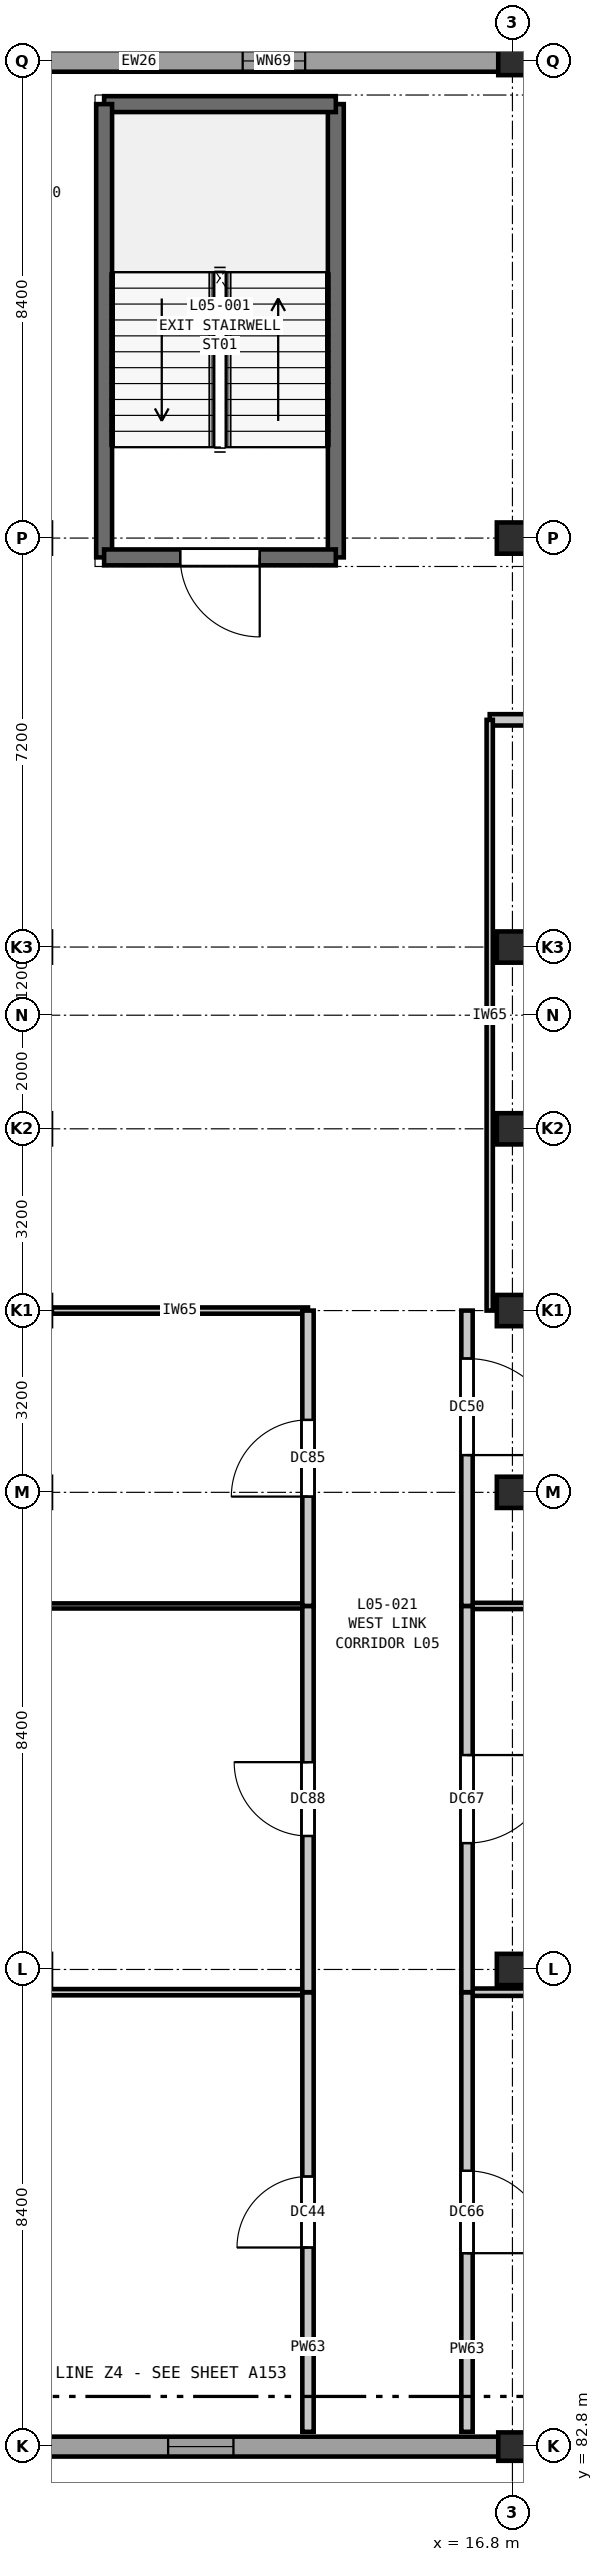
"""IFC4 building model, lengths in metres.
Left out: names, types, materials, properties, quantities, classifications, styles, units other than length and angle.
Written with IfcOpenShell. Run it as: python <this file> out.ifc"""

import sys

from ifc_helpers import new_model, si_unit, direction, frame, frame_2d, origin, origin_2d, place, context, subcontext, project, spatial, rectangle, extrude, element, fill, save


model = new_model("IFC4")
c1 = context("Model", 3, precision=1e-05, world=origin(), true_north=direction((0.0, 1.0)))
c2 = subcontext(c1, "Body", "Model", "MODEL_VIEW")
j1 = project(units=[si_unit("LENGTHUNIT", "METRE"), si_unit("PLANEANGLEUNIT", "RADIAN")], contexts=[c1])
p1 = place(None, origin())
s1 = spatial("IfcSite", under=j1, at=p1, CompositionType="ELEMENT")
p2 = place(p1, origin())
s2 = spatial("IfcBuilding", under=s1, at=p2, CompositionType="ELEMENT")
p3 = place(p2, frame((0.0, 0.0, 24.6)))
s3 = spatial("IfcBuildingStorey", under=s2, at=p3, CompositionType="ELEMENT", Elevation=24.6)
p4 = place(p3, frame((16.8, 82.8, 0.0), z_axis=(0.0, 0.0, 1.0), x_axis=(1.0, 0.0, 0.0)))
e1 = element("IfcColumn", 1, at=p4, inside=s3, PredefinedType="COLUMN", context=c2, shape_type="SweptSolid", body=[
    extrude(rectangle(XDim=0.5, YDim=0.5, at=origin_2d()), origin(), (0.0, 0.0, 1.0), 4.2),
])
for number, where, z_axis, x_axis in (
    (2, (16.8, 91.2, 0.0), (0.0, 0.0, 1.0), (1.0, 0.0, 0.0)),
    (3, (16.8, 99.6, 0.0), (0.0, 0.0, 1.0), (1.0, 0.0, 0.0)),
    (4, (16.8, 102.8, 0.0), (0.0, 0.0, 1.0), (1.0, 0.0, 0.0)),
    (5, (16.8, 106.0, 0.0), (0.0, 0.0, 1.0), (1.0, 0.0, 0.0)),
    (6, (16.8, 109.2, 0.0), (0.0, 0.0, 1.0), (1.0, 0.0, 0.0)),
    (7, (16.8, 116.4, 0.0), (0.0, 0.0, 1.0), (1.0, 0.0, 0.0)),
):
    element("IfcColumn", number, at=place(p3, frame(where, z_axis=z_axis, x_axis=x_axis)), inside=s3, PredefinedType="COLUMN", context=c2, shape_type="SweptSolid", body=[
        extrude(rectangle(XDim=0.55, YDim=0.55, at=origin_2d()), origin(), (0.0, 0.0, 1.0), 4.2),
    ])
p5 = place(p3, frame((16.8, 124.8, 0.0), z_axis=(0.0, 0.0, 1.0), x_axis=(1.0, 0.0, 0.0)))
e8 = element("IfcColumn", 8, at=p5, inside=s3, PredefinedType="COLUMN", context=c2, shape_type="SweptSolid", body=[
    extrude(rectangle(XDim=0.5, YDim=0.5, at=origin_2d()), origin(), (0.0, 0.0, 1.0), 4.2),
])
p6 = place(p3, frame((16.552, 82.8, 0.0), z_axis=(0.0, 0.0, 1.0), x_axis=(-1.0, 0.0, 0.0)))
e9 = element("IfcWall", 9, at=p6, inside=s3, PredefinedType="SOLIDWALL", context=c2, shape_type="SweptSolid", body=[
    extrude(rectangle(XDim=7.904, YDim=0.35, at=frame_2d((3.952, 0.0))), origin(), (0.0, 0.0, 1.0), 3.48),
])
p7 = place(p6, frame((4.665, 0.0, 0.9)))
e10 = element("IfcOpeningElement", 10, at=p7, cuts=e9, PredefinedType="OPENING", context=c2, shape_type="SweptSolid", body=[
    extrude(rectangle(XDim=1.15, YDim=1.4, at=frame_2d((0.575, 0.7))), frame((0.0, 0.185, 0.0), z_axis=(0.0, -1.0, 0.0), x_axis=(1.0, 0.0, 0.0)), (0.0, 0.0, 1.0), 0.37),
])
p8 = place(p3, frame((8.648, 124.8, 0.0), z_axis=(0.0, 0.0, 1.0), x_axis=(1.0, 0.0, 0.0)))
e11 = element("IfcWall", 11, at=p8, inside=s3, PredefinedType="SOLIDWALL", context=c2, shape_type="SweptSolid", body=[
    extrude(rectangle(XDim=7.904, YDim=0.38, at=frame_2d((3.952, 0.0))), origin(), (0.0, 0.0, 1.0), 3.48),
])
p9 = place(p8, frame((3.402, 0.0, 0.9)))
e12 = element("IfcOpeningElement", 12, at=p9, cuts=e11, PredefinedType="OPENING", context=c2, shape_type="SweptSolid", body=[
    extrude(rectangle(XDim=1.1, YDim=1.55, at=frame_2d((0.55, 0.775))), frame((0.0, 0.2, 0.0), z_axis=(0.0, -1.0, 0.0), x_axis=(1.0, 0.0, 0.0)), (0.0, 0.0, 1.0), 0.4),
])
p10 = place(p3, frame((13.69, 116.06, 0.0), z_axis=(0.0, 0.0, 1.0), x_axis=(0.0, 1.0, 0.0)))
e13 = element("IfcWall", 13, at=p10, inside=s3, PredefinedType="SHEAR", context=c2, shape_type="SweptSolid", body=[
    extrude(rectangle(XDim=7.98, YDim=0.28, at=frame_2d((3.99, 0.0))), origin(), (0.0, 0.0, 1.0), 4.2),
])
p11 = place(p3, frame((13.69, 124.04, 0.0), z_axis=(0.0, 0.0, 1.0), x_axis=(-1.0, 0.0, 0.0)))
e14 = element("IfcWall", 14, at=p11, inside=s3, PredefinedType="SHEAR", context=c2, shape_type="SweptSolid", body=[
    extrude(rectangle(XDim=4.08, YDim=0.28, at=frame_2d((2.04, 0.0))), origin(), (0.0, 0.0, 1.0), 4.2),
])
p12 = place(p3, frame((9.61, 124.04, 0.0), z_axis=(0.0, 0.0, 1.0), x_axis=(0.0, -1.0, 0.0)))
e15 = element("IfcWall", 15, at=p12, inside=s3, PredefinedType="SHEAR", context=c2, shape_type="SweptSolid", body=[
    extrude(rectangle(XDim=7.98, YDim=0.28, at=frame_2d((3.99, 0.0))), origin(), (0.0, 0.0, 1.0), 4.2),
])
p13 = place(p3, frame((9.61, 116.06, 0.0), z_axis=(0.0, 0.0, 1.0), x_axis=(1.0, 0.0, 0.0)))
e16 = element("IfcWall", 16, at=p13, inside=s3, PredefinedType="SHEAR", context=c2, shape_type="SweptSolid", body=[
    extrude(rectangle(XDim=4.08, YDim=0.28, at=frame_2d((2.04, 0.0))), origin(), (0.0, 0.0, 1.0), 4.2),
])
p14 = place(p13, frame((1.34, 0.0, 0.0)))
e17 = element("IfcOpeningElement", 17, at=p14, cuts=e16, PredefinedType="OPENING", context=c2, shape_type="SweptSolid", body=[
    extrude(rectangle(XDim=1.4, YDim=2.2, at=frame_2d((0.7, 1.1))), frame((0.0, 0.15, 0.0), z_axis=(0.0, -1.0, 0.0), x_axis=(1.0, 0.0, 0.0)), (0.0, 0.0, 1.0), 0.3),
])
p15 = place(p3, frame((0.26, 90.8, 0.0), z_axis=(0.0, 0.0, 1.0), x_axis=(1.0, 0.0, 0.0)))
e18 = element("IfcWall", 18, at=p15, inside=s3, PredefinedType="PARTITIONING", context=c2, shape_type="SweptSolid", body=[
    extrude(rectangle(XDim=12.94, YDim=0.11, at=frame_2d((6.47, 0.0))), origin(), (0.0, 0.0, 1.0), 3.92),
])
p16 = place(p3, frame((16.0, 90.8, 0.0), z_axis=(0.0, 0.0, 1.0), x_axis=(1.0, 0.0, 0.0)))
e19 = element("IfcWall", 19, at=p16, inside=s3, PredefinedType="PARTITIONING", context=c2, shape_type="SweptSolid", body=[
    extrude(rectangle(XDim=8.94, YDim=0.13, at=frame_2d((4.47, 0.0))), origin(), (0.0, 0.0, 1.0), 3.92),
])
p17 = place(p3, frame((0.26, 97.6, 0.0), z_axis=(0.0, 0.0, 1.0), x_axis=(1.0, 0.0, 0.0)))
e20 = element("IfcWall", 20, at=p17, inside=s3, PredefinedType="PARTITIONING", context=c2, shape_type="SweptSolid", body=[
    extrude(rectangle(XDim=12.94, YDim=0.09, at=frame_2d((6.47, 0.0))), origin(), (0.0, 0.0, 1.0), 3.92),
])
p18 = place(p3, frame((16.0, 97.6, 0.0), z_axis=(0.0, 0.0, 1.0), x_axis=(1.0, 0.0, 0.0)))
e21 = element("IfcWall", 21, at=p18, inside=s3, PredefinedType="PARTITIONING", context=c2, shape_type="SweptSolid", body=[
    extrude(rectangle(XDim=8.94, YDim=0.11, at=frame_2d((4.47, 0.0))), origin(), (0.0, 0.0, 1.0), 3.92),
])
p19 = place(p3, frame((8.69, 102.8, 0.0), z_axis=(0.0, 0.0, 1.0), x_axis=(1.0, 0.0, 0.0)))
e22 = element("IfcWall", 22, at=p19, inside=s3, PredefinedType="PARTITIONING", context=c2, shape_type="SweptSolid", body=[
    extrude(rectangle(XDim=4.51, YDim=0.11, at=frame_2d((2.255, 0.0))), origin(), (0.0, 0.0, 1.0), 3.585),
])
p20 = place(p3, frame((16.4, 113.2, 0.0), z_axis=(0.0, 0.0, 1.0), x_axis=(1.0, 0.0, 0.0)))
e23 = element("IfcWall", 23, at=p20, inside=s3, PredefinedType="PARTITIONING", context=c2, shape_type="SweptSolid", body=[
    extrude(rectangle(XDim=6.8, YDim=0.2, at=frame_2d((3.4, 0.0))), origin(), (0.0, 0.0, 1.0), 3.92),
])
p21 = place(p20, frame((2.55, 0.0, 0.0)))
e24 = element("IfcOpeningElement", 24, at=p21, cuts=e23, PredefinedType="OPENING", context=c2, shape_type="SweptSolid", body=[
    extrude(rectangle(XDim=1.7, YDim=2.3, at=frame_2d((0.85, 1.15))), frame((0.0, 0.11, 0.0), z_axis=(0.0, -1.0, 0.0), x_axis=(1.0, 0.0, 0.0)), (0.0, 0.0, 1.0), 0.22),
])
p22 = place(p3, frame((13.2, 83.06, 0.0), z_axis=(0.0, 0.0, 1.0), x_axis=(0.0, 1.0, 0.0)))
e25 = element("IfcWall", 25, at=p22, inside=s3, PredefinedType="PARTITIONING", context=c2, shape_type="SweptSolid", body=[
    extrude(rectangle(XDim=7.74, YDim=0.2, at=frame_2d((3.87, 0.0))), origin(), (0.0, 0.0, 1.0), 3.92),
])
p23 = place(p22, frame((3.245, 0.0, 0.0)))
e26 = element("IfcOpeningElement", 26, at=p23, cuts=e25, PredefinedType="OPENING", context=c2, shape_type="SweptSolid", body=[
    extrude(rectangle(XDim=1.25, YDim=2.15, at=frame_2d((0.625, 1.075))), frame((0.0, 0.11, 0.0), z_axis=(0.0, -1.0, 0.0), x_axis=(1.0, 0.0, 0.0)), (0.0, 0.0, 1.0), 0.22),
])
p24 = place(p3, frame((13.2, 90.8, 0.0), z_axis=(0.0, 0.0, 1.0), x_axis=(0.0, 1.0, 0.0)))
e27 = element("IfcWall", 27, at=p24, inside=s3, PredefinedType="PARTITIONING", context=c2, shape_type="SweptSolid", body=[
    extrude(rectangle(XDim=6.8, YDim=0.2, at=frame_2d((3.4, 0.0))), origin(), (0.0, 0.0, 1.0), 3.92),
])
p25 = place(p24, frame((2.75, 0.0, 0.0)))
e28 = element("IfcOpeningElement", 28, at=p25, cuts=e27, PredefinedType="OPENING", context=c2, shape_type="SweptSolid", body=[
    extrude(rectangle(XDim=1.3, YDim=2.2, at=frame_2d((0.65, 1.1))), frame((0.0, 0.11, 0.0), z_axis=(0.0, -1.0, 0.0), x_axis=(1.0, 0.0, 0.0)), (0.0, 0.0, 1.0), 0.22),
])
p26 = place(p3, frame((13.2, 97.6, 0.0), z_axis=(0.0, 0.0, 1.0), x_axis=(0.0, 1.0, 0.0)))
e29 = element("IfcWall", 29, at=p26, inside=s3, PredefinedType="PARTITIONING", context=c2, shape_type="SweptSolid", body=[
    extrude(rectangle(XDim=5.2, YDim=0.2, at=frame_2d((2.6, 0.0))), origin(), (0.0, 0.0, 1.0), 3.92),
])
p27 = place(p26, frame((1.925, 0.0, 0.0)))
e30 = element("IfcOpeningElement", 30, at=p27, cuts=e29, PredefinedType="OPENING", context=c2, shape_type="SweptSolid", body=[
    extrude(rectangle(XDim=1.35, YDim=2.2, at=frame_2d((0.675, 1.1))), frame((0.0, 0.11, 0.0), z_axis=(0.0, -1.0, 0.0), x_axis=(1.0, 0.0, 0.0)), (0.0, 0.0, 1.0), 0.22),
])
p28 = place(p3, frame((16.0, 83.06, 0.0), z_axis=(0.0, 0.0, 1.0), x_axis=(0.0, 1.0, 0.0)))
e31 = element("IfcWall", 31, at=p28, inside=s3, PredefinedType="PARTITIONING", context=c2, shape_type="SweptSolid", body=[
    extrude(rectangle(XDim=7.74, YDim=0.2, at=frame_2d((3.87, 0.0))), origin(), (0.0, 0.0, 1.0), 3.92),
])
p29 = place(p28, frame((3.145, 0.0, 0.0)))
e32 = element("IfcOpeningElement", 32, at=p29, cuts=e31, PredefinedType="OPENING", context=c2, shape_type="SweptSolid", body=[
    extrude(rectangle(XDim=1.45, YDim=2.25, at=frame_2d((0.725, 1.125))), frame((0.0, 0.11, 0.0), z_axis=(0.0, -1.0, 0.0), x_axis=(1.0, 0.0, 0.0)), (0.0, 0.0, 1.0), 0.22),
])
p30 = place(p3, frame((16.0, 90.8, 0.0), z_axis=(0.0, 0.0, 1.0), x_axis=(0.0, 1.0, 0.0)))
e33 = element("IfcWall", 33, at=p30, inside=s3, PredefinedType="PARTITIONING", context=c2, shape_type="SweptSolid", body=[
    extrude(rectangle(XDim=6.8, YDim=0.2, at=frame_2d((3.4, 0.0))), origin(), (0.0, 0.0, 1.0), 3.92),
])
p31 = place(p30, frame((2.625, 0.0, 0.0)))
e34 = element("IfcOpeningElement", 34, at=p31, cuts=e33, PredefinedType="OPENING", context=c2, shape_type="SweptSolid", body=[
    extrude(rectangle(XDim=1.55, YDim=2.25, at=frame_2d((0.775, 1.125))), frame((0.0, 0.11, 0.0), z_axis=(0.0, -1.0, 0.0), x_axis=(1.0, 0.0, 0.0)), (0.0, 0.0, 1.0), 0.22),
])
p32 = place(p3, frame((16.0, 97.6, 0.0), z_axis=(0.0, 0.0, 1.0), x_axis=(0.0, 1.0, 0.0)))
e35 = element("IfcWall", 35, at=p32, inside=s3, PredefinedType="PARTITIONING", context=c2, shape_type="SweptSolid", body=[
    extrude(rectangle(XDim=5.2, YDim=0.2, at=frame_2d((2.6, 0.0))), origin(), (0.0, 0.0, 1.0), 3.92),
])
p33 = place(p32, frame((2.656, 0.0, 0.0)))
e36 = element("IfcOpeningElement", 36, at=p33, cuts=e35, PredefinedType="OPENING", context=c2, shape_type="SweptSolid", body=[
    extrude(rectangle(XDim=1.7, YDim=2.3, at=frame_2d((0.85, 1.15))), frame((0.0, 0.11, 0.0), z_axis=(0.0, -1.0, 0.0), x_axis=(1.0, 0.0, 0.0)), (0.0, 0.0, 1.0), 0.22),
])
p34 = place(p3, frame((16.4, 102.8, 0.0), z_axis=(0.0, 0.0, 1.0), x_axis=(0.0, 1.0, 0.0)))
e37 = element("IfcWall", 37, at=p34, inside=s3, PredefinedType="PARTITIONING", context=c2, shape_type="SweptSolid", body=[
    extrude(rectangle(XDim=10.4, YDim=0.11, at=frame_2d((5.2, 0.0))), origin(), (0.0, 0.0, 1.0), 3.92),
])
p35 = place(p7, origin())
e38 = element("IfcWindow", 38, at=p35, inside=s3, PartitioningType="SINGLE_PANEL", PredefinedType="WINDOW", context=c2, shape_type="SweptSolid", body=[
    extrude(rectangle(XDim=1.15, YDim=1.4, at=frame_2d((0.575, 0.7))), frame((0.0, 0.03, 0.0), z_axis=(0.0, -1.0, 0.0), x_axis=(1.0, 0.0, 0.0)), (0.0, 0.0, 1.0), 0.06),
])
fill(e10, e38)
p36 = place(p9, origin())
e39 = element("IfcWindow", 39, at=p36, inside=s3, PartitioningType="SINGLE_PANEL", PredefinedType="WINDOW", context=c2, shape_type="SweptSolid", body=[
    extrude(rectangle(XDim=1.1, YDim=1.55, at=frame_2d((0.55, 0.775))), frame((0.0, 0.03, 0.0), z_axis=(0.0, -1.0, 0.0), x_axis=(1.0, 0.0, 0.0)), (0.0, 0.0, 1.0), 0.06),
])
fill(e12, e39)
p37 = place(p14, frame((1.4, 0.0, 0.0), z_axis=(0.0, 0.0, 1.0), x_axis=(-1.0, 0.0, 0.0)))
e40 = element("IfcDoor", 40, at=p37, inside=s3, OperationType="SINGLE_SWING_LEFT", PredefinedType="DOOR", context=c2, shape_type="SweptSolid", body=[
    extrude(rectangle(XDim=1.4, YDim=2.2, at=frame_2d((0.7, 1.1))), frame((0.0, 0.025, 0.0), z_axis=(0.0, -1.0, 0.0), x_axis=(1.0, 0.0, 0.0)), (0.0, 0.0, 1.0), 0.05),
])
fill(e17, e40)
p38 = place(p23, origin())
e41 = element("IfcDoor", 41, at=p38, inside=s3, OperationType="SINGLE_SWING_LEFT", PredefinedType="DOOR", context=c2, shape_type="SweptSolid", body=[
    extrude(rectangle(XDim=1.25, YDim=2.15, at=frame_2d((0.625, 1.075))), frame((0.0, 0.025, 0.0), z_axis=(0.0, -1.0, 0.0), x_axis=(1.0, 0.0, 0.0)), (0.0, 0.0, 1.0), 0.05),
])
fill(e26, e41)
p39 = place(p25, origin())
e42 = element("IfcDoor", 42, at=p39, inside=s3, OperationType="SINGLE_SWING_RIGHT", PredefinedType="DOOR", context=c2, shape_type="SweptSolid", body=[
    extrude(rectangle(XDim=1.3, YDim=2.2, at=frame_2d((0.65, 1.1))), frame((0.0, 0.025, 0.0), z_axis=(0.0, -1.0, 0.0), x_axis=(1.0, 0.0, 0.0)), (0.0, 0.0, 1.0), 0.05),
])
fill(e28, e42)
p40 = place(p27, origin())
e43 = element("IfcDoor", 43, at=p40, inside=s3, OperationType="SINGLE_SWING_LEFT", PredefinedType="DOOR", context=c2, shape_type="SweptSolid", body=[
    extrude(rectangle(XDim=1.35, YDim=2.2, at=frame_2d((0.675, 1.1))), frame((0.0, 0.025, 0.0), z_axis=(0.0, -1.0, 0.0), x_axis=(1.0, 0.0, 0.0)), (0.0, 0.0, 1.0), 0.05),
])
fill(e30, e43)
p41 = place(p29, frame((1.45, 0.0, 0.0), z_axis=(0.0, 0.0, 1.0), x_axis=(-1.0, 0.0, 0.0)))
e44 = element("IfcDoor", 44, at=p41, inside=s3, OperationType="SINGLE_SWING_RIGHT", PredefinedType="DOOR", context=c2, shape_type="SweptSolid", body=[
    extrude(rectangle(XDim=1.45, YDim=2.25, at=frame_2d((0.725, 1.125))), frame((0.0, 0.025, 0.0), z_axis=(0.0, -1.0, 0.0), x_axis=(1.0, 0.0, 0.0)), (0.0, 0.0, 1.0), 0.05),
])
fill(e32, e44)
p42 = place(p31, frame((1.55, 0.0, 0.0), z_axis=(0.0, 0.0, 1.0), x_axis=(-1.0, 0.0, 0.0)))
e45 = element("IfcDoor", 45, at=p42, inside=s3, OperationType="SINGLE_SWING_LEFT", PredefinedType="DOOR", context=c2, shape_type="SweptSolid", body=[
    extrude(rectangle(XDim=1.55, YDim=2.25, at=frame_2d((0.775, 1.125))), frame((0.0, 0.025, 0.0), z_axis=(0.0, -1.0, 0.0), x_axis=(1.0, 0.0, 0.0)), (0.0, 0.0, 1.0), 0.05),
])
fill(e34, e45)
p43 = place(p33, frame((1.7, 0.0, 0.0), z_axis=(0.0, 0.0, 1.0), x_axis=(-1.0, 0.0, 0.0)))
e46 = element("IfcDoor", 46, at=p43, inside=s3, OperationType="SINGLE_SWING_RIGHT", PredefinedType="DOOR", context=c2, shape_type="SweptSolid", body=[
    extrude(rectangle(XDim=1.7, YDim=2.3, at=frame_2d((0.85, 1.15))), frame((0.0, 0.025, 0.0), z_axis=(0.0, -1.0, 0.0), x_axis=(1.0, 0.0, 0.0)), (0.0, 0.0, 1.0), 0.05),
])
fill(e36, e46)
save(model, sys.argv[1])
